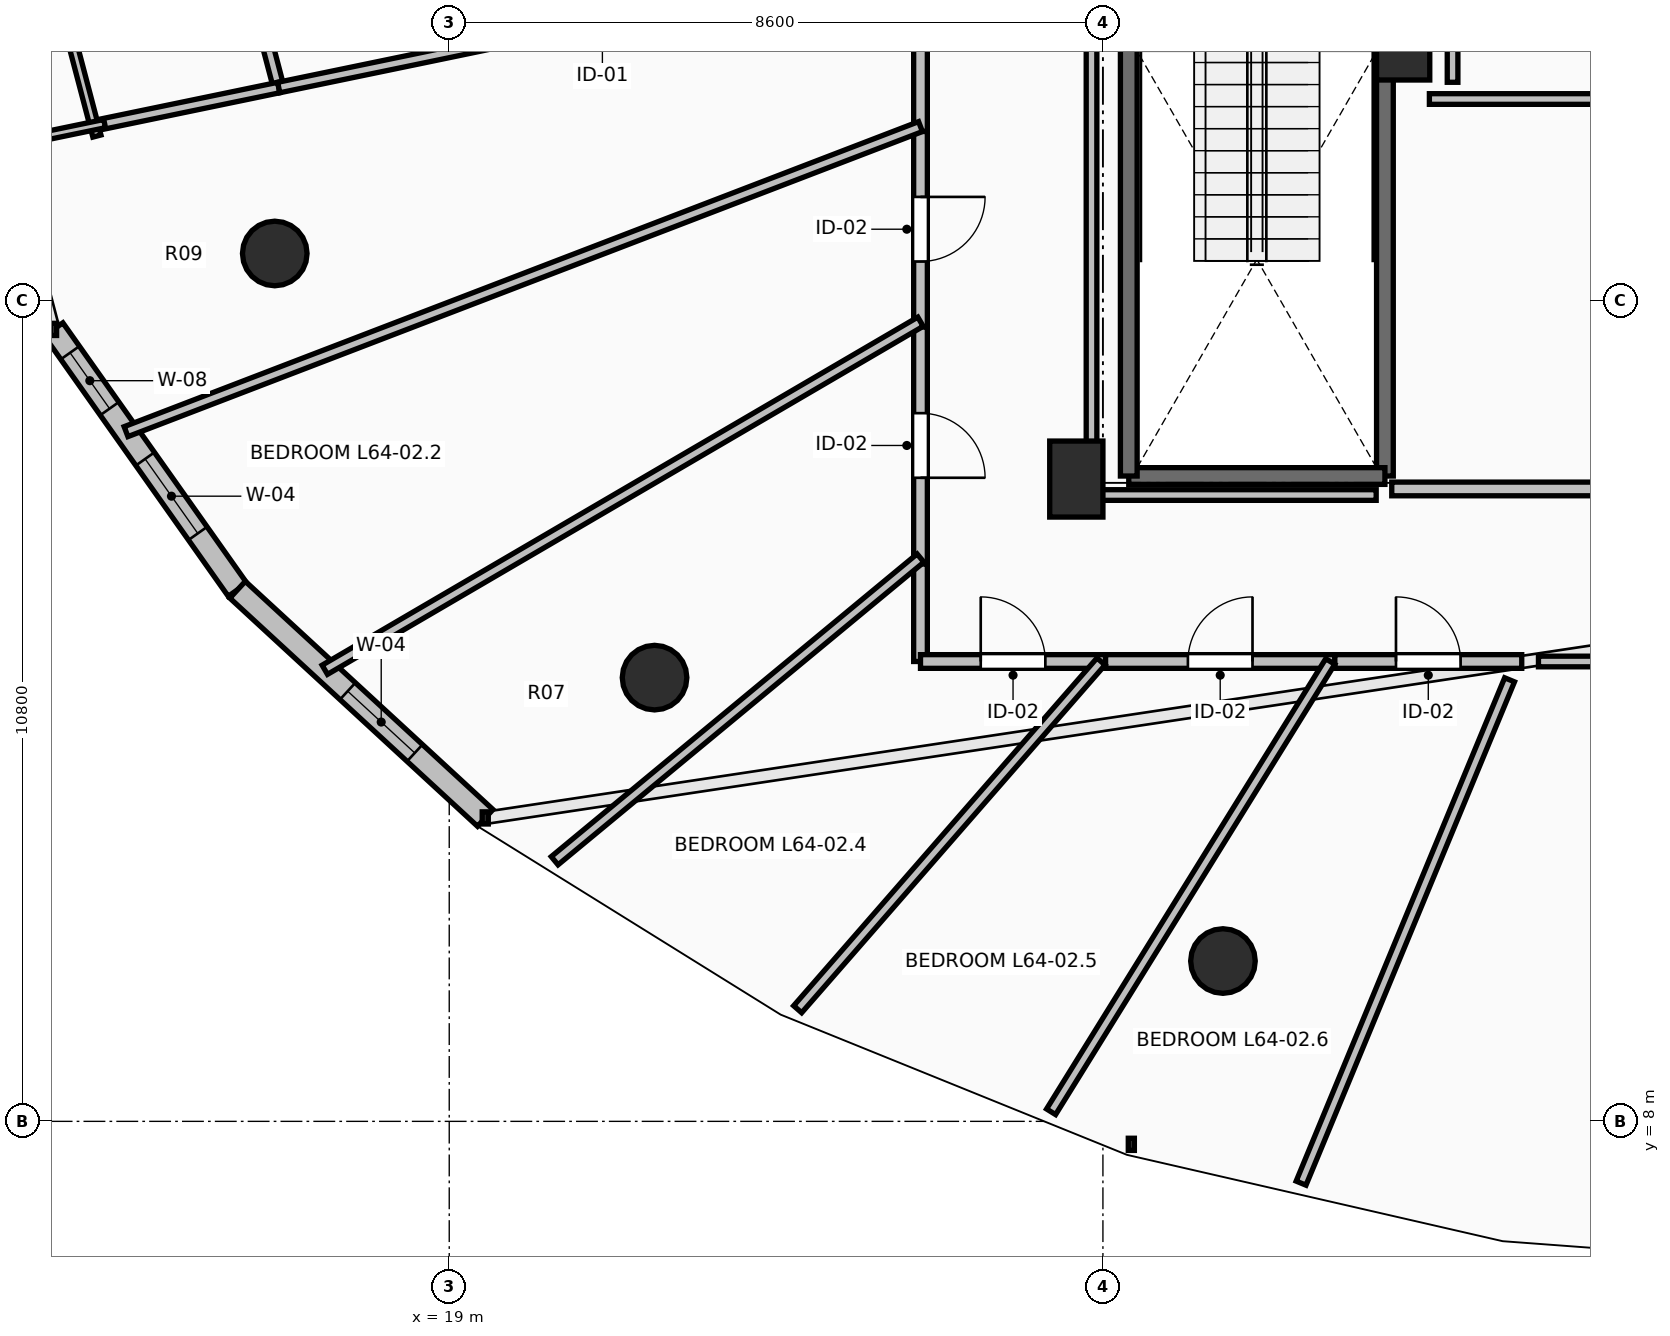
"""IFC4 building model, lengths in metres.
Left out: names, types, materials, properties, quantities, classifications, styles, units other than length and angle.
Written with IfcOpenShell. Run it as: python <this file> out.ifc"""

import sys

from ifc_helpers import new_model, si_unit, direction, frame, frame_2d, origin, origin_2d, place, context, subcontext, project, spatial, rectangle, circle, extrude, element, fill, save


model = new_model("IFC4")
c1 = context("Model", 3, precision=1e-05, world=origin(), true_north=direction((0.0, 1.0)))
c2 = subcontext(c1, "Body", "Model", "MODEL_VIEW")
j1 = project(units=[si_unit("LENGTHUNIT", "METRE"), si_unit("PLANEANGLEUNIT", "RADIAN")], contexts=[c1])
p1 = place(None, origin())
s1 = spatial("IfcSite", under=j1, at=p1, CompositionType="ELEMENT")
p2 = place(p1, origin())
s2 = spatial("IfcBuilding", under=s1, at=p2, CompositionType="ELEMENT")
p3 = place(p2, frame((0.0, 0.0, 237.8)))
s3 = spatial("IfcBuildingStorey", under=s2, at=p3, CompositionType="ELEMENT", Elevation=237.8)
for number, where, z_axis, x_axis in (
    (1, (16.705, 19.418, 0.0), (0.0, 0.0, 1.0), (-0.924, -0.383, 0.0)),
    (2, (21.701, 13.838, 0.0), (0.0, 0.0, 1.0), (-0.707, -0.707, 0.0)),
    (3, (29.179, 10.109, 0.0), (0.0, 0.0, 1.0), (-0.383, -0.924, 0.0)),
):
    element("IfcColumn", number, at=place(p3, frame(where, z_axis=z_axis, x_axis=x_axis)), inside=s3, PredefinedType="COLUMN", context=c2, shape_type="SweptSolid", body=[
        extrude(circle(Radius=0.425, at=origin_2d()), origin(), (0.0, 0.0, 1.0), 3.55),
    ])
for number, where, z_axis, x_axis in (
    (4, (27.25, 16.45, 0.0), (0.0, 0.0, 1.0), (1.0, 0.0, 0.0)),
    (5, (31.55, 22.2, 0.0), (0.0, 0.0, 1.0), (1.0, 0.0, 0.0)),
):
    element("IfcColumn", number, at=place(p3, frame(where, z_axis=z_axis, x_axis=x_axis)), inside=s3, PredefinedType="PILASTER", context=c2, shape_type="SweptSolid", body=[
        extrude(rectangle(XDim=0.7, YDim=1.0, at=origin_2d()), origin(), (0.0, 0.0, 1.0), 3.55),
    ])
p4 = place(p3, frame((13.794, 18.419, 0.0), z_axis=(0.0, 0.0, 1.0), x_axis=(0.577261247247, -0.816559521668, 0.0)))
e6 = element("IfcWall", 6, at=p4, inside=s3, PredefinedType="STANDARD", context=c2, shape_type="SweptSolid", body=[
    extrude(rectangle(XDim=4.194, YDim=0.3, at=frame_2d((2.097, 0.0))), origin(), (0.0, 0.0, 1.0), 3.29),
])
p5 = place(p4, frame((0.376, 0.0, 0.85)))
e7 = element("IfcOpeningElement", 7, at=p5, cuts=e6, PredefinedType="OPENING", context=c2, shape_type="SweptSolid", body=[
    extrude(rectangle(XDim=0.9, YDim=1.8, at=frame_2d((0.45, 0.9))), frame((0.0, 0.165, 0.0), z_axis=(0.0, -1.0, 0.0), x_axis=(1.0, 0.0, 0.0)), (0.0, 0.0, 1.0), 0.33),
])
p6 = place(p4, frame((2.087, 0.0, 0.85)))
e8 = element("IfcOpeningElement", 8, at=p6, cuts=e6, PredefinedType="OPENING", context=c2, shape_type="SweptSolid", body=[
    extrude(rectangle(XDim=1.2, YDim=1.95, at=frame_2d((0.6, 0.975))), frame((0.0, 0.165, 0.0), z_axis=(0.0, -1.0, 0.0), x_axis=(1.0, 0.0, 0.0)), (0.0, 0.0, 1.0), 0.33),
])
p7 = place(p3, frame((16.216, 14.994, 0.0), z_axis=(0.0, 0.0, 1.0), x_axis=(0.735445373611, -0.677584018727, 0.0)))
e9 = element("IfcWall", 9, at=p7, inside=s3, PredefinedType="STANDARD", context=c2, shape_type="SweptSolid", body=[
    extrude(rectangle(XDim=4.43, YDim=0.3, at=frame_2d((2.215, 0.0))), origin(), (0.0, 0.0, 1.0), 3.29),
])
p8 = place(p7, frame((1.969, 0.0, 0.85)))
e10 = element("IfcOpeningElement", 10, at=p8, cuts=e9, PredefinedType="OPENING", context=c2, shape_type="SweptSolid", body=[
    extrude(rectangle(XDim=1.2, YDim=1.95, at=frame_2d((0.6, 0.975))), frame((0.0, 0.165, 0.0), z_axis=(0.0, -1.0, 0.0), x_axis=(1.0, 0.0, 0.0)), (0.0, 0.0, 1.0), 0.33),
])
p9 = place(p3, frame((31.31, 23.91, 0.0), z_axis=(0.0, 0.0, 1.0), x_axis=(0.0, -1.0, 0.0)))
e11 = element("IfcWall", 11, at=p9, inside=s3, PredefinedType="SOLIDWALL", context=c2, shape_type="SweptSolid", body=[
    extrude(rectangle(XDim=7.42, YDim=0.22, at=frame_2d((3.71, 0.0))), origin(), (0.0, 0.0, 1.0), 3.29),
])
p10 = place(p3, frame((31.31, 16.49, 0.0), z_axis=(0.0, 0.0, 1.0), x_axis=(-1.0, 0.0, 0.0)))
e12 = element("IfcWall", 12, at=p10, inside=s3, PredefinedType="SOLIDWALL", context=c2, shape_type="SweptSolid", body=[
    extrude(rectangle(XDim=3.37, YDim=0.22, at=frame_2d((1.685, 0.0))), origin(), (0.0, 0.0, 1.0), 3.29),
])
p11 = place(p3, frame((27.94, 16.49, 0.0), z_axis=(0.0, 0.0, 1.0), x_axis=(0.0, 1.0, 0.0)))
e13 = element("IfcWall", 13, at=p11, inside=s3, PredefinedType="SOLIDWALL", context=c2, shape_type="SweptSolid", body=[
    extrude(rectangle(XDim=7.42, YDim=0.22, at=frame_2d((3.71, 0.0))), origin(), (0.0, 0.0, 1.0), 3.29),
])
p12 = place(p3, frame((35.005, 21.45, 0.0), z_axis=(0.0, 0.0, 1.0), x_axis=(-1.0, 0.0, 0.0)))
e14 = element("IfcWall", 14, at=p12, inside=s3, PredefinedType="PARTITIONING", context=c2, shape_type="SweptSolid", body=[
    extrude(rectangle(XDim=3.11, YDim=0.14, at=frame_2d((1.555, 0.0))), origin(), (0.0, 0.0, 1.0), 3.29),
])
p13 = place(p3, frame((31.4, 16.32, 0.0), z_axis=(0.0, 0.0, 1.0), x_axis=(1.0, 0.0, 0.0)))
e15 = element("IfcWall", 15, at=p13, inside=s3, PredefinedType="PARTITIONING", context=c2, shape_type="SweptSolid", body=[
    extrude(rectangle(XDim=7.4, YDim=0.18, at=frame_2d((3.7, 0.0))), origin(), (0.0, 0.0, 1.0), 3.29),
])
p14 = place(p13, frame((3.275, 0.0, 0.0)))
e16 = element("IfcOpeningElement", 16, at=p14, cuts=e15, PredefinedType="OPENING", context=c2, shape_type="SweptSolid", body=[
    extrude(rectangle(XDim=0.85, YDim=2.1, at=frame_2d((0.425, 1.05))), frame((0.0, 0.105, 0.0), z_axis=(0.0, -1.0, 0.0), x_axis=(1.0, 0.0, 0.0)), (0.0, 0.0, 1.0), 0.21),
])
p15 = place(p3, frame((25.2, 23.288, 0.0), z_axis=(0.0, 0.0, 1.0), x_axis=(0.0, -1.0, 0.0)))
e17 = element("IfcWall", 17, at=p15, inside=s3, PredefinedType="PARTITIONING", context=c2, shape_type="SweptSolid", body=[
    extrude(rectangle(XDim=2.265, YDim=0.18, at=frame_2d((1.133, 0.0))), origin(), (0.0, 0.0, 1.0), 3.29),
])
p16 = place(p3, frame((25.2, 21.023, 0.0), z_axis=(0.0, 0.0, 1.0), x_axis=(0.0, -1.0, 0.0)))
e18 = element("IfcWall", 18, at=p16, inside=s3, PredefinedType="PARTITIONING", context=c2, shape_type="SweptSolid", body=[
    extrude(rectangle(XDim=2.572, YDim=0.18, at=frame_2d((1.286, 0.0))), origin(), (0.0, 0.0, 1.0), 3.29),
])
p17 = place(p16, frame((0.861, 0.0, 0.0)))
e19 = element("IfcOpeningElement", 19, at=p17, cuts=e18, PredefinedType="OPENING", context=c2, shape_type="SweptSolid", body=[
    extrude(rectangle(XDim=0.85, YDim=2.1, at=frame_2d((0.425, 1.05))), frame((0.0, 0.105, 0.0), z_axis=(0.0, -1.0, 0.0), x_axis=(1.0, 0.0, 0.0)), (0.0, 0.0, 1.0), 0.21),
])
p18 = place(p3, frame((25.2, 18.451, 0.0), z_axis=(0.0, 0.0, 1.0), x_axis=(0.0, -1.0, 0.0)))
e20 = element("IfcWall", 20, at=p18, inside=s3, PredefinedType="PARTITIONING", context=c2, shape_type="SweptSolid", body=[
    extrude(rectangle(XDim=3.118, YDim=0.18, at=frame_2d((1.559, 0.0))), origin(), (0.0, 0.0, 1.0), 2.482),
])
p19 = place(p18, frame((1.134, 0.0, 0.0)))
e21 = element("IfcOpeningElement", 21, at=p19, cuts=e20, PredefinedType="OPENING", context=c2, shape_type="SweptSolid", body=[
    extrude(rectangle(XDim=0.85, YDim=2.1, at=frame_2d((0.425, 1.05))), frame((0.0, 0.105, 0.0), z_axis=(0.0, -1.0, 0.0), x_axis=(1.0, 0.0, 0.0)), (0.0, 0.0, 1.0), 0.21),
])
p20 = place(p3, frame((25.2, 15.333, 0.0), z_axis=(0.0, 0.0, 1.0), x_axis=(0.0, -1.0, 0.0)))
e22 = element("IfcWall", 22, at=p20, inside=s3, PredefinedType="PARTITIONING", context=c2, shape_type="SweptSolid", body=[
    extrude(rectangle(XDim=1.283, YDim=0.18, at=frame_2d((0.642, 0.0))), origin(), (0.0, 0.0, 1.0), 2.482),
])
p21 = place(p3, frame((25.2, 14.05, 0.0), z_axis=(0.0, 0.0, 1.0), x_axis=(1.0, 0.0, 0.0)))
e23 = element("IfcWall", 23, at=p21, inside=s3, PredefinedType="PARTITIONING", context=c2, shape_type="SweptSolid", body=[
    extrude(rectangle(XDim=2.435, YDim=0.18, at=frame_2d((1.218, 0.0))), origin(), (0.0, 0.0, 1.0), 2.924),
])
p22 = place(p21, frame((0.792, 0.0, 0.0)))
e24 = element("IfcOpeningElement", 24, at=p22, cuts=e23, PredefinedType="OPENING", context=c2, shape_type="SweptSolid", body=[
    extrude(rectangle(XDim=0.85, YDim=2.1, at=frame_2d((0.425, 1.05))), frame((0.0, 0.105, 0.0), z_axis=(0.0, -1.0, 0.0), x_axis=(1.0, 0.0, 0.0)), (0.0, 0.0, 1.0), 0.21),
])
p23 = place(p3, frame((27.635, 14.05, 0.0), z_axis=(0.0, 0.0, 1.0), x_axis=(1.0, 0.0, 0.0)))
e25 = element("IfcWall", 25, at=p23, inside=s3, PredefinedType="PARTITIONING", context=c2, shape_type="SweptSolid", body=[
    extrude(rectangle(XDim=3.016, YDim=0.18, at=frame_2d((1.508, 0.0))), origin(), (0.0, 0.0, 1.0), 2.482),
])
p24 = place(p23, frame((1.083, 0.0, 0.0)))
e26 = element("IfcOpeningElement", 26, at=p24, cuts=e25, PredefinedType="OPENING", context=c2, shape_type="SweptSolid", body=[
    extrude(rectangle(XDim=0.85, YDim=2.1, at=frame_2d((0.425, 1.05))), frame((0.0, 0.105, 0.0), z_axis=(0.0, -1.0, 0.0), x_axis=(1.0, 0.0, 0.0)), (0.0, 0.0, 1.0), 0.21),
])
p25 = place(p3, frame((30.651, 14.05, 0.0), z_axis=(0.0, 0.0, 1.0), x_axis=(1.0, 0.0, 0.0)))
e27 = element("IfcWall", 27, at=p25, inside=s3, PredefinedType="PARTITIONING", context=c2, shape_type="SweptSolid", body=[
    extrude(rectangle(XDim=2.459, YDim=0.18, at=frame_2d((1.229, 0.0))), origin(), (0.0, 0.0, 1.0), 2.972),
])
p26 = place(p25, frame((0.804, 0.0, 0.0)))
e28 = element("IfcOpeningElement", 28, at=p26, cuts=e27, PredefinedType="OPENING", context=c2, shape_type="SweptSolid", body=[
    extrude(rectangle(XDim=0.85, YDim=2.1, at=frame_2d((0.425, 1.05))), frame((0.0, 0.105, 0.0), z_axis=(0.0, -1.0, 0.0), x_axis=(1.0, 0.0, 0.0)), (0.0, 0.0, 1.0), 0.21),
])
p27 = place(p3, frame((15.6, 26.0, 0.0), z_axis=(0.0, 0.0, 1.0), x_axis=(0.25436383836, -0.967108596661, 0.0)))
e29 = element("IfcWall", 29, at=p27, inside=s3, PredefinedType="PARTITIONING", context=c2, shape_type="SweptSolid", body=[
    extrude(rectangle(XDim=4.549, YDim=0.14, at=frame_2d((2.274, 0.0))), origin(), (0.0, 0.0, 1.0), 2.482),
])
p28 = place(p27, frame((1.824, 0.0, 0.0)))
e30 = element("IfcOpeningElement", 30, at=p28, cuts=e29, PredefinedType="OPENING", context=c2, shape_type="SweptSolid", body=[
    extrude(rectangle(XDim=0.9, YDim=2.1, at=frame_2d((0.45, 1.05))), frame((0.0, 0.085, 0.0), z_axis=(0.0, -1.0, 0.0), x_axis=(1.0, 0.0, 0.0)), (0.0, 0.0, 1.0), 0.17),
])
p29 = place(p3, frame((16.757, 21.601, 0.0), z_axis=(0.0, 0.0, 1.0), x_axis=(-0.979193678003, -0.2029279206, 0.0)))
e31 = element("IfcWall", 31, at=p29, inside=s3, PredefinedType="PARTITIONING", context=c2, shape_type="SweptSolid", body=[
    extrude(rectangle(XDim=2.479, YDim=0.14, at=frame_2d((1.24, 0.0))), origin(), (0.0, 0.0, 1.0), 2.874),
])
p30 = place(p3, frame((16.757, 21.601, 0.0), z_axis=(0.0, 0.0, 1.0), x_axis=(0.979226116247, 0.20277133244, 0.0)))
e32 = element("IfcWall", 32, at=p30, inside=s3, PredefinedType="PARTITIONING", context=c2, shape_type="SweptSolid", body=[
    extrude(rectangle(XDim=8.622, YDim=0.14, at=frame_2d((4.311, 0.0))), origin(), (0.0, 0.0, 1.0), 2.924),
])
p31 = place(p30, frame((3.861, 0.0, 0.0)))
e33 = element("IfcOpeningElement", 33, at=p31, cuts=e32, PredefinedType="OPENING", context=c2, shape_type="SweptSolid", body=[
    extrude(rectangle(XDim=0.9, YDim=2.1, at=frame_2d((0.45, 1.05))), frame((0.0, 0.085, 0.0), z_axis=(0.0, -1.0, 0.0), x_axis=(1.0, 0.0, 0.0)), (0.0, 0.0, 1.0), 0.17),
])
p32 = place(p3, frame((14.365, 20.963, 0.0), z_axis=(0.0, 0.0, 1.0), x_axis=(-0.254288836667, 0.967128320104, 0.0)))
e34 = element("IfcWall", 34, at=p32, inside=s3, PredefinedType="PARTITIONING", context=c2, shape_type="SweptSolid", body=[
    extrude(rectangle(XDim=5.349, YDim=0.11, at=frame_2d((2.674, 0.0))), origin(), (0.0, 0.0, 1.0), 3.29),
])
p33 = place(p3, frame((12.708, 20.763, 0.0), z_axis=(0.0, 0.0, 1.0), x_axis=(0.979256697864, 0.202623591143, 0.0)))
e35 = element("IfcWall", 35, at=p33, inside=s3, PredefinedType="PARTITIONING", context=c2, shape_type="SweptSolid", body=[
    extrude(rectangle(XDim=1.795, YDim=0.11, at=frame_2d((0.898, 0.0))), origin(), (0.0, 0.0, 1.0), 3.29),
])
p34 = place(p3, frame((14.748, 17.074, 0.0), z_axis=(0.0, 0.0, 1.0), x_axis=(0.93355564233, 0.358432507836, 0.0)))
e36 = element("IfcWall", 36, at=p34, inside=s3, PredefinedType="PARTITIONING", context=c2, shape_type="SweptSolid", body=[
    extrude(rectangle(XDim=11.196, YDim=0.14, at=frame_2d((5.598, 0.0))), origin(), (0.0, 0.0, 1.0), 2.482),
])
p35 = place(p3, frame((17.363, 13.941, 0.0), z_axis=(0.0, 0.0, 1.0), x_axis=(0.863415767124, 0.5044930258, 0.0)))
e37 = element("IfcWall", 37, at=p35, inside=s3, PredefinedType="PARTITIONING", context=c2, shape_type="SweptSolid", body=[
    extrude(rectangle(XDim=9.077, YDim=0.14, at=frame_2d((4.538, 0.0))), origin(), (0.0, 0.0, 1.0), 2.482),
])
p36 = place(p3, frame((20.387, 11.429, 0.0), z_axis=(0.0, 0.0, 1.0), x_axis=(0.770490958976, 0.637450925277, 0.0)))
e38 = element("IfcWall", 38, at=p36, inside=s3, PredefinedType="PARTITIONING", context=c2, shape_type="SweptSolid", body=[
    extrude(rectangle(XDim=6.247, YDim=0.14, at=frame_2d((3.123, 0.0))), origin(), (0.0, 0.0, 1.0), 2.482),
])
p37 = place(p3, frame((23.584, 9.475, 0.0), z_axis=(0.0, 0.0, 1.0), x_axis=(0.657373610703, 0.75356481868, 0.0)))
e39 = element("IfcWall", 39, at=p37, inside=s3, PredefinedType="PARTITIONING", context=c2, shape_type="SweptSolid", body=[
    extrude(rectangle(XDim=6.071, YDim=0.14, at=frame_2d((3.036, 0.0))), origin(), (0.0, 0.0, 1.0), 2.874),
])
p38 = place(p3, frame((26.918, 8.126, 0.0), z_axis=(0.0, 0.0, 1.0), x_axis=(0.526957378796, 0.849891711298, 0.0)))
e40 = element("IfcWall", 40, at=p38, inside=s3, PredefinedType="PARTITIONING", context=c2, shape_type="SweptSolid", body=[
    extrude(rectangle(XDim=6.97, YDim=0.14, at=frame_2d((3.485, 0.0))), origin(), (0.0, 0.0, 1.0), 2.482),
])
p39 = place(p3, frame((32.2, 24.13, 0.0), z_axis=(0.0, 0.0, 1.0), x_axis=(0.0, -1.0, 0.0)))
e41 = element("IfcWall", 41, at=p39, inside=s3, PredefinedType="PARTITIONING", context=c2, shape_type="SweptSolid", body=[
    extrude(rectangle(XDim=2.46, YDim=0.14, at=frame_2d((1.23, 0.0))), origin(), (0.0, 0.0, 1.0), 2.482),
])
p40 = place(p3, frame((33.33, 14.05, 0.0), z_axis=(0.0, 0.0, 1.0), x_axis=(1.0, 0.0, 0.0)))
e42 = element("IfcWall", 42, at=p40, inside=s3, PredefinedType="PARTITIONING", context=c2, shape_type="SweptSolid", body=[
    extrude(rectangle(XDim=3.22, YDim=0.14, at=frame_2d((1.61, 0.0))), origin(), (0.0, 0.0, 1.0), 2.972),
])
p41 = place(p3, frame((27.45, 23.754, 0.0), z_axis=(0.0, 0.0, 1.0), x_axis=(0.0, -1.0, 0.0)))
e43 = element("IfcWall", 43, at=p41, inside=s3, PredefinedType="PARTITIONING", context=c2, shape_type="SweptSolid", body=[
    extrude(rectangle(XDim=7.514, YDim=0.14, at=frame_2d((3.757, 0.0))), origin(), (0.0, 0.0, 1.0), 2.482),
])
p42 = place(p3, frame((27.45, 16.24, 0.0), z_axis=(0.0, 0.0, 1.0), x_axis=(1.0, 0.0, 0.0)))
e44 = element("IfcWall", 44, at=p42, inside=s3, PredefinedType="PARTITIONING", context=c2, shape_type="SweptSolid", body=[
    extrude(rectangle(XDim=3.745, YDim=0.14, at=frame_2d((1.873, 0.0))), origin(), (0.0, 0.0, 1.0), 2.482),
])
p43 = place(p3, frame((30.207, 7.187, 0.0), z_axis=(0.0, 0.0, 1.0), x_axis=(0.382679691634, 0.923881081964, 0.0)))
e45 = element("IfcWall", 45, at=p43, inside=s3, PredefinedType="PARTITIONING", context=c2, shape_type="SweptSolid", body=[
    extrude(rectangle(XDim=7.168, YDim=0.14, at=frame_2d((3.584, 0.0))), origin(), (0.0, 0.0, 1.0), 2.874),
])
p44 = place(p5, origin())
e46 = element("IfcWindow", 46, at=p44, inside=s3, PartitioningType="SINGLE_PANEL", PredefinedType="WINDOW", context=c2, shape_type="SweptSolid", body=[
    extrude(rectangle(XDim=0.9, YDim=1.8, at=frame_2d((0.45, 0.9))), frame((0.0, 0.03, 0.0), z_axis=(0.0, -1.0, 0.0), x_axis=(1.0, 0.0, 0.0)), (0.0, 0.0, 1.0), 0.06),
])
fill(e7, e46)
p45 = place(p6, origin())
e47 = element("IfcWindow", 47, at=p45, inside=s3, PartitioningType="SINGLE_PANEL", PredefinedType="WINDOW", context=c2, shape_type="SweptSolid", body=[
    extrude(rectangle(XDim=1.2, YDim=1.95, at=frame_2d((0.6, 0.975))), frame((0.0, 0.03, 0.0), z_axis=(0.0, -1.0, 0.0), x_axis=(1.0, 0.0, 0.0)), (0.0, 0.0, 1.0), 0.06),
])
fill(e8, e47)
p46 = place(p8, origin())
e48 = element("IfcWindow", 48, at=p46, inside=s3, PartitioningType="SINGLE_PANEL", PredefinedType="WINDOW", context=c2, shape_type="SweptSolid", body=[
    extrude(rectangle(XDim=1.2, YDim=1.95, at=frame_2d((0.6, 0.975))), frame((0.0, 0.03, 0.0), z_axis=(0.0, -1.0, 0.0), x_axis=(1.0, 0.0, 0.0)), (0.0, 0.0, 1.0), 0.06),
])
fill(e10, e48)
p47 = place(p17, origin())
e49 = element("IfcDoor", 49, at=p47, inside=s3, OperationType="SINGLE_SWING_LEFT", PredefinedType="DOOR", context=c2, shape_type="SweptSolid", body=[
    extrude(rectangle(XDim=0.85, YDim=2.1, at=frame_2d((0.425, 1.05))), frame((0.0, 0.025, 0.0), z_axis=(0.0, -1.0, 0.0), x_axis=(1.0, 0.0, 0.0)), (0.0, 0.0, 1.0), 0.05),
])
fill(e19, e49)
p48 = place(p19, origin())
e50 = element("IfcDoor", 50, at=p48, inside=s3, OperationType="SINGLE_SWING_RIGHT", PredefinedType="DOOR", context=c2, shape_type="SweptSolid", body=[
    extrude(rectangle(XDim=0.85, YDim=2.1, at=frame_2d((0.425, 1.05))), frame((0.0, 0.025, 0.0), z_axis=(0.0, -1.0, 0.0), x_axis=(1.0, 0.0, 0.0)), (0.0, 0.0, 1.0), 0.05),
])
fill(e21, e50)
p49 = place(p22, origin())
e51 = element("IfcDoor", 51, at=p49, inside=s3, OperationType="SINGLE_SWING_LEFT", PredefinedType="DOOR", context=c2, shape_type="SweptSolid", body=[
    extrude(rectangle(XDim=0.85, YDim=2.1, at=frame_2d((0.425, 1.05))), frame((0.0, 0.025, 0.0), z_axis=(0.0, -1.0, 0.0), x_axis=(1.0, 0.0, 0.0)), (0.0, 0.0, 1.0), 0.05),
])
fill(e24, e51)
p50 = place(p24, origin())
e52 = element("IfcDoor", 52, at=p50, inside=s3, OperationType="SINGLE_SWING_RIGHT", PredefinedType="DOOR", context=c2, shape_type="SweptSolid", body=[
    extrude(rectangle(XDim=0.85, YDim=2.1, at=frame_2d((0.425, 1.05))), frame((0.0, 0.025, 0.0), z_axis=(0.0, -1.0, 0.0), x_axis=(1.0, 0.0, 0.0)), (0.0, 0.0, 1.0), 0.05),
])
fill(e26, e52)
p51 = place(p26, origin())
e53 = element("IfcDoor", 53, at=p51, inside=s3, OperationType="SINGLE_SWING_LEFT", PredefinedType="DOOR", context=c2, shape_type="SweptSolid", body=[
    extrude(rectangle(XDim=0.85, YDim=2.1, at=frame_2d((0.425, 1.05))), frame((0.0, 0.025, 0.0), z_axis=(0.0, -1.0, 0.0), x_axis=(1.0, 0.0, 0.0)), (0.0, 0.0, 1.0), 0.05),
])
fill(e28, e53)
save(model, sys.argv[1])
